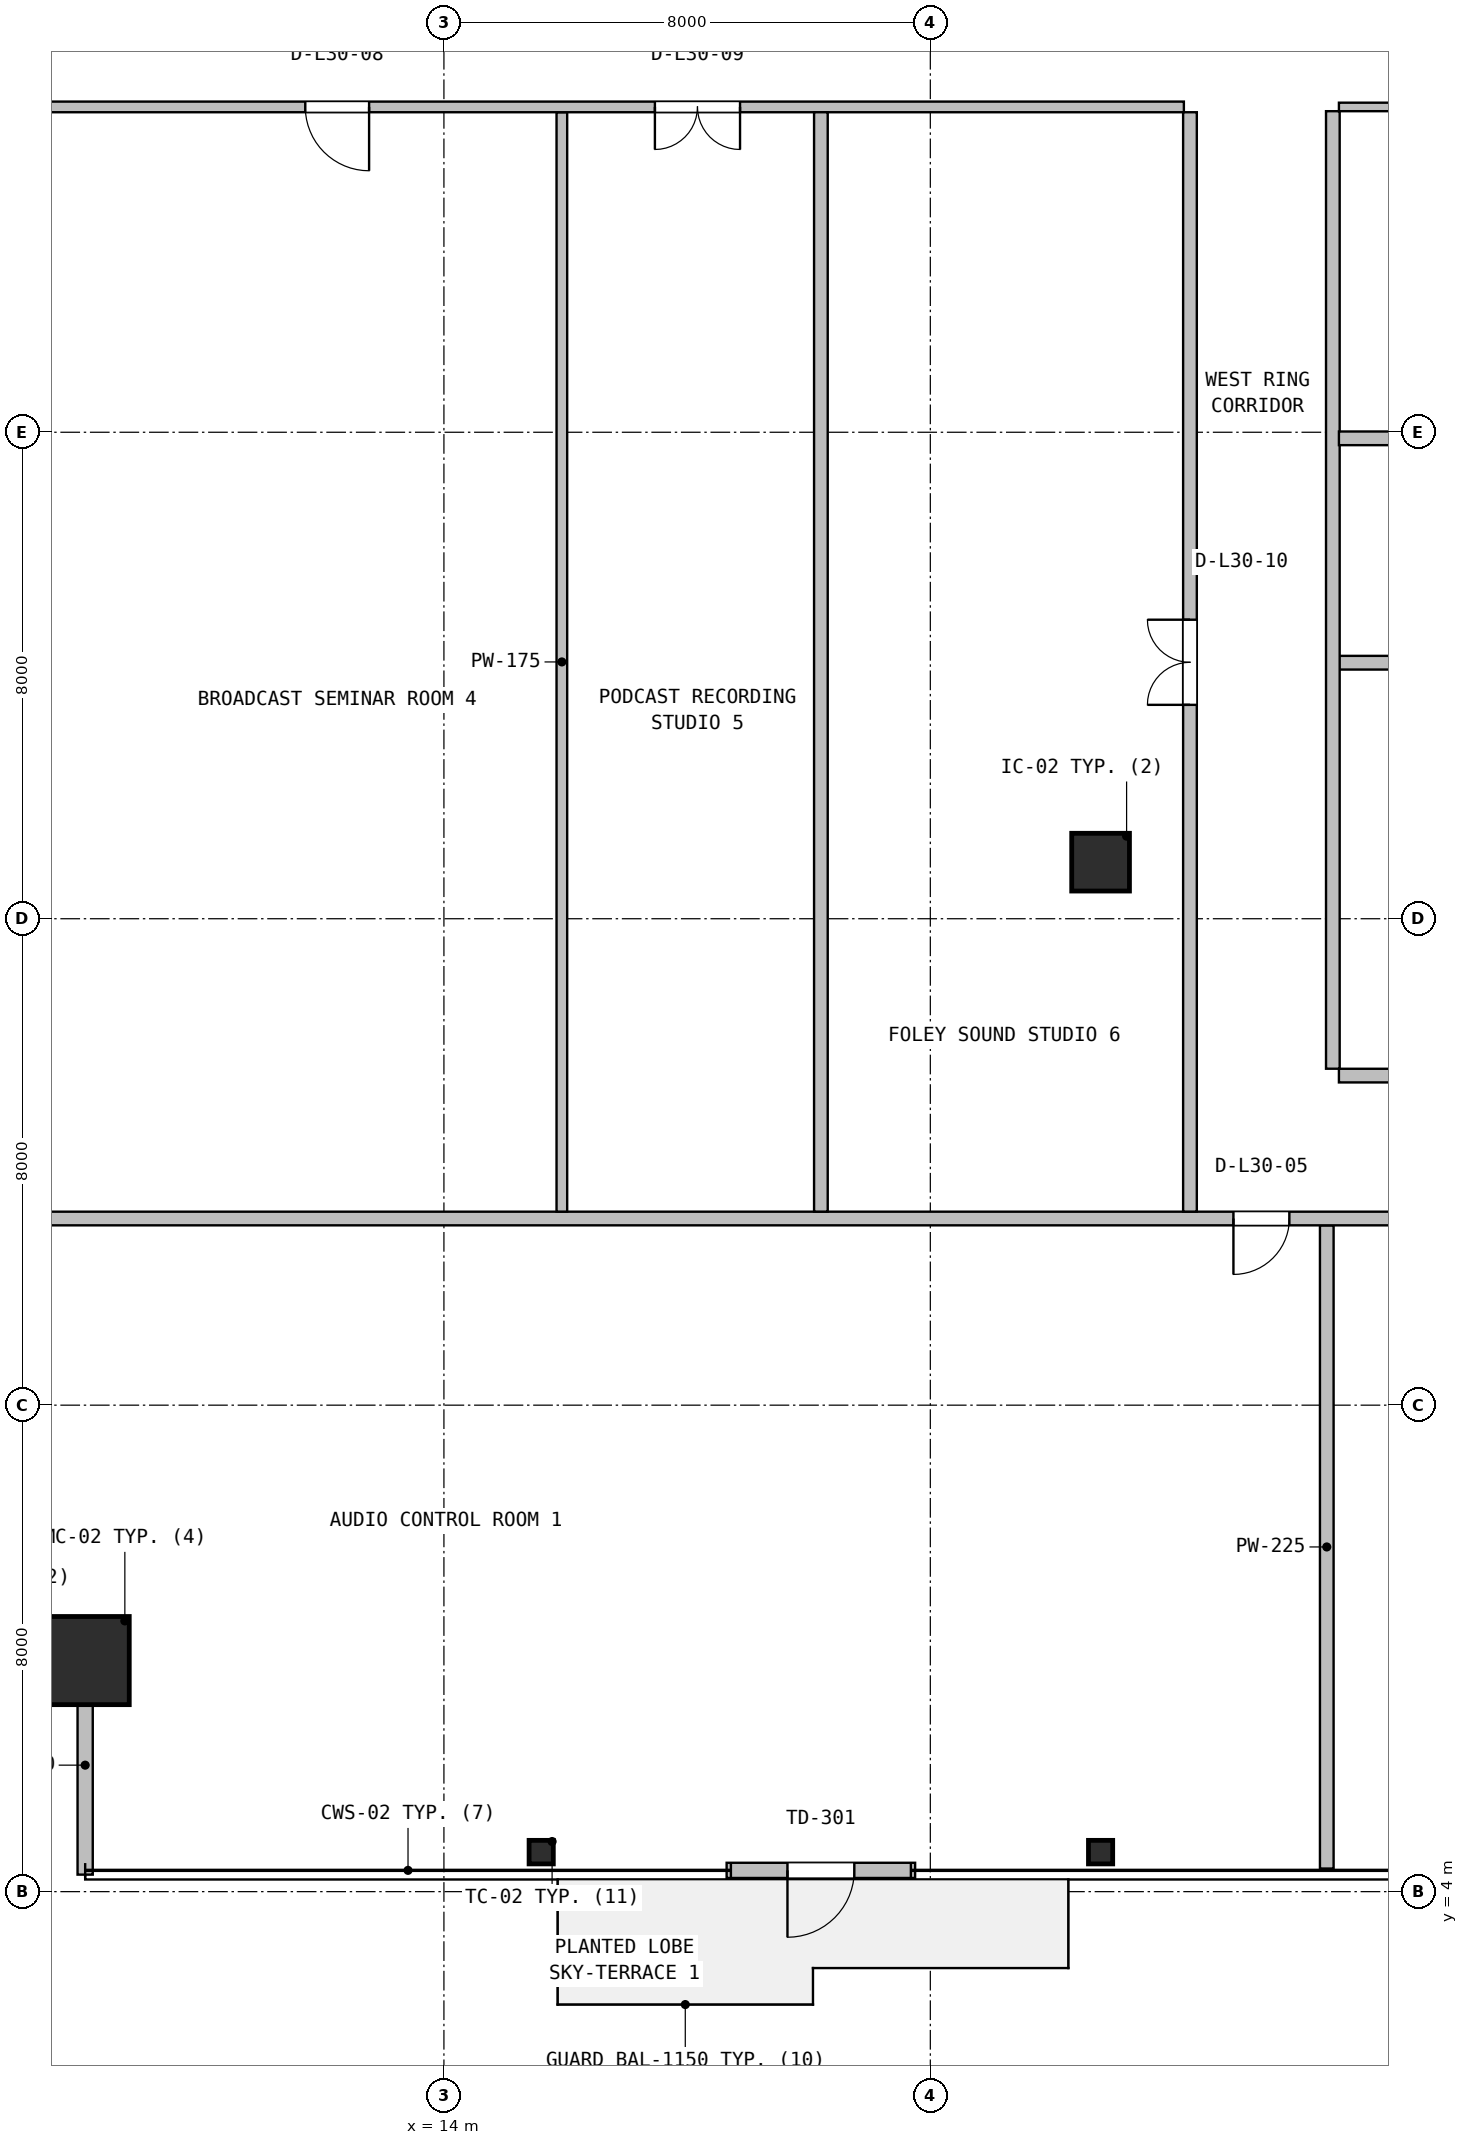
"""IFC4 building model, lengths in metres.
Left out: names, types, materials, properties, quantities, classifications, styles, units other than length and angle.
Written with IfcOpenShell. Run it as: python <this file> out.ifc"""

import sys

from ifc_helpers import new_model, si_unit, direction, frame, frame_2d, origin, origin_2d, place, context, subcontext, project, spatial, rectangle, hollow_rectangle, i_section, extrude, source, transform, mapped, element, fill, save


model = new_model("IFC4")
c1 = context("Model", 3, precision=1e-05, world=origin(), true_north=direction((0.0, 1.0)))
c2 = subcontext(c1, "Body", "Model", "MODEL_VIEW")
j1 = project(units=[si_unit("LENGTHUNIT", "METRE"), si_unit("PLANEANGLEUNIT", "RADIAN")], contexts=[c1])
p1 = place(None, origin())
s1 = spatial("IfcSite", under=j1, at=p1, CompositionType="ELEMENT")
p2 = place(p1, origin())
s2 = spatial("IfcBuilding", under=s1, at=p2, CompositionType="ELEMENT")
p3 = place(p2, frame((0.0, 0.0, 125.8)))
s3 = spatial("IfcBuildingStorey", under=s2, at=p3, CompositionType="ELEMENT", Elevation=125.8)
m1 = source(origin(), c2, "Body", "SweptSolid", [
    extrude(hollow_rectangle(XDim=1.45, YDim=1.45, WallThickness=0.055, at=origin_2d()), origin(), (0.0, 0.0, 1.0), 3.8),
])
p4 = place(p3, frame((8.1, 7.8, 0.0), z_axis=(0.0, 0.0, 1.0), x_axis=(1.0, 0.0, 0.0)))
e1 = element("IfcColumn", 1, at=p4, inside=s3, PredefinedType="COLUMN", context=c2, shape_type="MappedRepresentation", body=[
    mapped(m1, transform((0.0, 0.0, 0.0), x_axis=(1.0, 0.0, 0.0), y_axis=(0.0, 1.0, 0.0), z_axis=(0.0, 0.0, 1.0), scale=1.0)),
])
m2 = source(origin(), c2, "Body", "SweptSolid", [
    extrude(i_section(OverallWidth=0.398, OverallDepth=0.387, WebThickness=0.021, FlangeThickness=0.033, FilletRadius=0.018, at=origin_2d()), origin(), (0.0, 0.0, 1.0), 3.8),
])
for number, where, z_axis, x_axis in (
    (2, (15.6, 4.65, 0.0), (0.0, 0.0, 1.0), (1.0, 0.0, 0.0)),
    (3, (24.8, 4.65, 0.0), (0.0, 0.0, 1.0), (1.0, 0.0, 0.0)),
):
    element("IfcColumn", number, at=place(p3, frame(where, z_axis=z_axis, x_axis=x_axis)), inside=s3, PredefinedType="COLUMN", context=c2, shape_type="MappedRepresentation", body=[
        mapped(m2, transform((0.0, 0.0, 0.0), x_axis=(1.0, 0.0, 0.0), y_axis=(0.0, 1.0, 0.0), z_axis=(0.0, 0.0, 1.0), scale=1.0)),
    ])
m3 = source(origin(), c2, "Body", "SweptSolid", [
    extrude(rectangle(XDim=0.95, YDim=0.95, at=origin_2d()), origin(), (0.0, 0.0, 1.0), 3.8),
])
p5 = place(p3, frame((24.8, 20.93, 0.0), z_axis=(0.0, 0.0, 1.0), x_axis=(1.0, 0.0, 0.0)))
e4 = element("IfcColumn", 4, at=p5, inside=s3, PredefinedType="COLUMN", context=c2, shape_type="MappedRepresentation", body=[
    mapped(m3, transform((0.0, 0.0, 0.0), x_axis=(1.0, 0.0, 0.0), y_axis=(0.0, 1.0, 0.0), z_axis=(0.0, 0.0, 1.0), scale=1.0)),
])
p6 = place(p3, frame((18.65, 4.35, 0.0), z_axis=(0.0, 0.0, 1.0), x_axis=(1.0, 0.0, 0.0)))
e5 = element("IfcWall", 5, at=p6, inside=s3, PredefinedType="SOLIDWALL", context=c2, shape_type="SweptSolid", body=[
    extrude(rectangle(XDim=3.1, YDim=0.25, at=frame_2d((1.55, 0.0))), origin(), (0.0, 0.0, 1.0), 3.53),
])
p7 = place(p6, frame((1.0, 0.0, 0.0)))
e6 = element("IfcOpeningElement", 6, at=p7, cuts=e5, PredefinedType="OPENING", context=c2, shape_type="SweptSolid", body=[
    extrude(rectangle(XDim=1.1, YDim=2.15, at=frame_2d((0.55, 1.075))), frame((0.0, 0.135, 0.0), z_axis=(0.0, -1.0, 0.0), x_axis=(1.0, 0.0, 0.0)), (0.0, 0.0, 1.0), 0.27),
])
p8 = place(p3, frame((8.1, 4.28, 0.0), z_axis=(0.0, 0.0, 1.0), x_axis=(0.0, 1.0, 0.0)))
e7 = element("IfcWall", 7, at=p8, inside=s3, PredefinedType="SOLIDWALL", context=c2, shape_type="SweptSolid", body=[
    extrude(rectangle(XDim=3.6, YDim=0.25, at=frame_2d((1.8, 0.0))), origin(), (0.0, 0.0, 1.0), 3.108),
])
p9 = place(p3, frame((28.52, 4.38, 0.0), z_axis=(0.0, 0.0, 1.0), x_axis=(0.0, 1.0, 0.0)))
e8 = element("IfcWall", 8, at=p9, inside=s3, PredefinedType="PARTITIONING", context=c2, shape_type="SweptSolid", body=[
    extrude(rectangle(XDim=10.577, YDim=0.225, at=frame_2d((5.289, 0.0))), origin(), (0.0, 0.0, 1.0), 3.108),
])
p10 = place(p3, frame((4.68, 15.07, 0.0), z_axis=(0.0, 0.0, 1.0), x_axis=(1.0, 0.0, 0.0)))
e9 = element("IfcWall", 9, at=p10, inside=s3, PredefinedType="PARTITIONING", context=c2, shape_type="SweptSolid", body=[
    extrude(rectangle(XDim=58.64, YDim=0.225, at=frame_2d((29.32, 0.0))), origin(), (0.0, 0.0, 1.0), 2.83),
])
p11 = place(p10, frame((22.305, 0.0, 0.0)))
e10 = element("IfcOpeningElement", 10, at=p11, cuts=e9, PredefinedType="OPENING", context=c2, shape_type="SweptSolid", body=[
    extrude(rectangle(XDim=0.92, YDim=2.08, at=frame_2d((0.46, 1.04))), frame((0.0, 0.123, 0.0), z_axis=(0.0, -1.0, 0.0), x_axis=(1.0, 0.0, 0.0)), (0.0, 0.0, 1.0), 0.245),
])
p12 = place(p10, frame((31.935, 0.0, 0.0)))
e11 = element("IfcOpeningElement", 11, at=p12, cuts=e9, PredefinedType="OPENING", context=c2, shape_type="SweptSolid", body=[
    extrude(rectangle(XDim=1.0, YDim=2.1, at=frame_2d((0.5, 1.05))), frame((0.0, 0.123, 0.0), z_axis=(0.0, -1.0, 0.0), x_axis=(1.0, 0.0, 0.0)), (0.0, 0.0, 1.0), 0.245),
])
p13 = place(p10, frame((41.665, 0.0, 0.0)))
e12 = element("IfcOpeningElement", 12, at=p13, cuts=e9, PredefinedType="OPENING", context=c2, shape_type="SweptSolid", body=[
    extrude(rectangle(XDim=0.88, YDim=2.06, at=frame_2d((0.44, 1.03))), frame((0.0, 0.123, 0.0), z_axis=(0.0, -1.0, 0.0), x_axis=(1.0, 0.0, 0.0)), (0.0, 0.0, 1.0), 0.245),
])
p14 = place(p3, frame((15.94, 15.183, 0.0), z_axis=(0.0, 0.0, 1.0), x_axis=(0.0, 1.0, 0.0)))
e13 = element("IfcWall", 13, at=p14, inside=s3, PredefinedType="PARTITIONING", context=c2, shape_type="SweptSolid", body=[
    extrude(rectangle(XDim=18.08, YDim=0.175, at=frame_2d((9.04, 0.0))), origin(), (0.0, 0.0, 1.0), 3.222),
])
p15 = place(p3, frame((4.68, 33.35, 0.0), z_axis=(0.0, 0.0, 1.0), x_axis=(1.0, 0.0, 0.0)))
e14 = element("IfcWall", 14, at=p15, inside=s3, PredefinedType="PARTITIONING", context=c2, shape_type="SweptSolid", body=[
    extrude(rectangle(XDim=21.49, YDim=0.175, at=frame_2d((10.745, 0.0))), origin(), (0.0, 0.0, 1.0), 2.83),
])
p16 = place(p15, frame((7.04, 0.0, 0.0)))
e15 = element("IfcOpeningElement", 15, at=p16, cuts=e14, PredefinedType="OPENING", context=c2, shape_type="SweptSolid", body=[
    extrude(rectangle(XDim=1.05, YDim=2.1, at=frame_2d((0.525, 1.05))), frame((0.0, 0.098, 0.0), z_axis=(0.0, -1.0, 0.0), x_axis=(1.0, 0.0, 0.0)), (0.0, 0.0, 1.0), 0.195),
])
p17 = place(p15, frame((12.79, 0.0, 0.0)))
e16 = element("IfcOpeningElement", 16, at=p17, cuts=e14, PredefinedType="OPENING", context=c2, shape_type="SweptSolid", body=[
    extrude(rectangle(XDim=1.4, YDim=2.12, at=frame_2d((0.7, 1.06))), frame((0.0, 0.098, 0.0), z_axis=(0.0, -1.0, 0.0), x_axis=(1.0, 0.0, 0.0)), (0.0, 0.0, 1.0), 0.195),
])
p18 = place(p3, frame((20.2, 15.183, 0.0), z_axis=(0.0, 0.0, 1.0), x_axis=(0.0, 1.0, 0.0)))
e17 = element("IfcWall", 17, at=p18, inside=s3, PredefinedType="PARTITIONING", context=c2, shape_type="SweptSolid", body=[
    extrude(rectangle(XDim=18.08, YDim=0.225, at=frame_2d((9.04, 0.0))), origin(), (0.0, 0.0, 1.0), 3.222),
])
p19 = place(p3, frame((26.27, 15.183, 0.0), z_axis=(0.0, 0.0, 1.0), x_axis=(0.0, 1.0, 0.0)))
e18 = element("IfcWall", 18, at=p19, inside=s3, PredefinedType="PARTITIONING", context=c2, shape_type="SweptSolid", body=[
    extrude(rectangle(XDim=18.08, YDim=0.225, at=frame_2d((9.04, 0.0))), origin(), (0.0, 0.0, 1.0), 2.83),
])
p20 = place(p19, frame((8.334, 0.0, 0.0)))
e19 = element("IfcOpeningElement", 19, at=p20, cuts=e18, PredefinedType="OPENING", context=c2, shape_type="SweptSolid", body=[
    extrude(rectangle(XDim=1.4, YDim=2.12, at=frame_2d((0.7, 1.06))), frame((0.0, 0.123, 0.0), z_axis=(0.0, -1.0, 0.0), x_axis=(1.0, 0.0, 0.0)), (0.0, 0.0, 1.0), 0.245),
])
p21 = place(p3, frame((28.72, 17.42, 0.0), z_axis=(0.0, 0.0, 1.0), x_axis=(1.0, 0.0, 0.0)))
e20 = element("IfcWall", 20, at=p21, inside=s3, PredefinedType="PARTITIONING", context=c2, shape_type="SweptSolid", body=[
    extrude(rectangle(XDim=16.79, YDim=0.225, at=frame_2d((8.395, 0.0))), origin(), (0.0, 0.0, 1.0), 2.83),
])
p22 = place(p21, frame((7.695, 0.0, 0.0)))
e21 = element("IfcOpeningElement", 21, at=p22, cuts=e20, PredefinedType="OPENING", context=c2, shape_type="SweptSolid", body=[
    extrude(rectangle(XDim=1.4, YDim=2.12, at=frame_2d((0.7, 1.06))), frame((0.0, 0.123, 0.0), z_axis=(0.0, -1.0, 0.0), x_axis=(1.0, 0.0, 0.0)), (0.0, 0.0, 1.0), 0.245),
])
p23 = place(p3, frame((28.72, 24.21, 0.0), z_axis=(0.0, 0.0, 1.0), x_axis=(1.0, 0.0, 0.0)))
e22 = element("IfcWall", 22, at=p23, inside=s3, PredefinedType="PARTITIONING", context=c2, shape_type="SweptSolid", body=[
    extrude(rectangle(XDim=16.79, YDim=0.225, at=frame_2d((8.395, 0.0))), origin(), (0.0, 0.0, 1.0), 2.83),
])
p24 = place(p3, frame((28.62, 17.533, 0.0), z_axis=(0.0, 0.0, 1.0), x_axis=(0.0, 1.0, 0.0)))
e23 = element("IfcWall", 23, at=p24, inside=s3, PredefinedType="PARTITIONING", context=c2, shape_type="SweptSolid", body=[
    extrude(rectangle(XDim=15.747, YDim=0.225, at=frame_2d((7.874, 0.0))), origin(), (0.0, 0.0, 1.0), 2.83),
])
p25 = place(p3, frame((28.72, 27.9, 0.0), z_axis=(0.0, 0.0, 1.0), x_axis=(1.0, 0.0, 0.0)))
e24 = element("IfcWall", 24, at=p25, inside=s3, PredefinedType="PARTITIONING", context=c2, shape_type="SweptSolid", body=[
    extrude(rectangle(XDim=16.79, YDim=0.225, at=frame_2d((8.395, 0.0))), origin(), (0.0, 0.0, 1.0), 2.83),
])
p26 = place(p3, frame((28.72, 33.35, 0.0), z_axis=(0.0, 0.0, 1.0), x_axis=(1.0, 0.0, 0.0)))
e25 = element("IfcWall", 25, at=p26, inside=s3, PredefinedType="PARTITIONING", context=c2, shape_type="SweptSolid", body=[
    extrude(rectangle(XDim=16.79, YDim=0.14, at=frame_2d((8.395, 0.0))), origin(), (0.0, 0.0, 1.0), 2.83),
])
p27 = place(p26, frame((7.895, 0.0, 0.0)))
e26 = element("IfcOpeningElement", 26, at=p27, cuts=e25, PredefinedType="OPENING", context=c2, shape_type="SweptSolid", body=[
    extrude(rectangle(XDim=1.0, YDim=2.1, at=frame_2d((0.5, 1.05))), frame((0.0, 0.08, 0.0), z_axis=(0.0, -1.0, 0.0), x_axis=(1.0, 0.0, 0.0)), (0.0, 0.0, 1.0), 0.16),
])
m4 = source(origin(), c2, "Body", "SweptSolid", [
    extrude(rectangle(XDim=1.1, YDim=2.15, at=frame_2d((0.55, 1.075))), frame((0.0, 0.025, 0.0), z_axis=(0.0, -1.0, 0.0), x_axis=(1.0, 0.0, 0.0)), (0.0, 0.0, 1.0), 0.05),
])
p28 = place(p7, frame((1.1, 0.0, 0.0), z_axis=(0.0, 0.0, 1.0), x_axis=(-1.0, 0.0, 0.0)))
e27 = element("IfcDoor", 27, at=p28, inside=s3, OperationType="SINGLE_SWING_LEFT", PredefinedType="DOOR", context=c2, shape_type="MappedRepresentation", body=[
    mapped(m4, transform((0.0, 0.0, 0.0), x_axis=(1.0, 0.0, 0.0), y_axis=(0.0, 1.0, 0.0), z_axis=(0.0, 0.0, 1.0), scale=1.0)),
])
fill(e6, e27)
m5 = source(origin(), c2, "Body", "SweptSolid", [
    extrude(rectangle(XDim=0.92, YDim=2.08, at=frame_2d((0.46, 1.04))), frame((0.0, 0.025, 0.0), z_axis=(0.0, -1.0, 0.0), x_axis=(1.0, 0.0, 0.0)), (0.0, 0.0, 1.0), 0.05),
])
p29 = place(p11, frame((0.92, 0.0, 0.0), z_axis=(0.0, 0.0, 1.0), x_axis=(-1.0, 0.0, 0.0)))
e28 = element("IfcDoor", 28, at=p29, inside=s3, OperationType="SINGLE_SWING_LEFT", PredefinedType="DOOR", context=c2, shape_type="MappedRepresentation", body=[
    mapped(m5, transform((0.0, 0.0, 0.0), x_axis=(1.0, 0.0, 0.0), y_axis=(0.0, 1.0, 0.0), z_axis=(0.0, 0.0, 1.0), scale=1.0)),
])
fill(e10, e28)
m6 = source(origin(), c2, "Body", "SweptSolid", [
    extrude(rectangle(XDim=1.05, YDim=2.1, at=frame_2d((0.525, 1.05))), frame((0.0, 0.025, 0.0), z_axis=(0.0, -1.0, 0.0), x_axis=(1.0, 0.0, 0.0)), (0.0, 0.0, 1.0), 0.05),
])
p30 = place(p16, frame((1.05, 0.0, 0.0), z_axis=(0.0, 0.0, 1.0), x_axis=(-1.0, 0.0, 0.0)))
e29 = element("IfcDoor", 29, at=p30, inside=s3, OperationType="SINGLE_SWING_RIGHT", PredefinedType="DOOR", context=c2, shape_type="MappedRepresentation", body=[
    mapped(m6, transform((0.0, 0.0, 0.0), x_axis=(1.0, 0.0, 0.0), y_axis=(0.0, 1.0, 0.0), z_axis=(0.0, 0.0, 1.0), scale=1.0)),
])
fill(e15, e29)
m7 = source(origin(), c2, "Body", "SweptSolid", [
    extrude(rectangle(XDim=1.4, YDim=2.12, at=frame_2d((0.7, 1.06))), frame((0.0, 0.025, 0.0), z_axis=(0.0, -1.0, 0.0), x_axis=(1.0, 0.0, 0.0)), (0.0, 0.0, 1.0), 0.05),
])
p31 = place(p17, frame((1.4, 0.0, 0.0), z_axis=(0.0, 0.0, 1.0), x_axis=(-1.0, 0.0, 0.0)))
e30 = element("IfcDoor", 30, at=p31, inside=s3, OperationType="DOUBLE_DOOR_SINGLE_SWING", PredefinedType="DOOR", context=c2, shape_type="MappedRepresentation", body=[
    mapped(m7, transform((0.0, 0.0, 0.0), x_axis=(1.0, 0.0, 0.0), y_axis=(0.0, 1.0, 0.0), z_axis=(0.0, 0.0, 1.0), scale=1.0)),
])
fill(e16, e30)
p32 = place(p20, origin())
e31 = element("IfcDoor", 31, at=p32, inside=s3, OperationType="DOUBLE_DOOR_SINGLE_SWING", PredefinedType="DOOR", context=c2, shape_type="MappedRepresentation", body=[
    mapped(m7, transform((0.0, 0.0, 0.0), x_axis=(1.0, 0.0, 0.0), y_axis=(0.0, 1.0, 0.0), z_axis=(0.0, 0.0, 1.0), scale=1.0)),
])
fill(e19, e31)
save(model, sys.argv[1])
